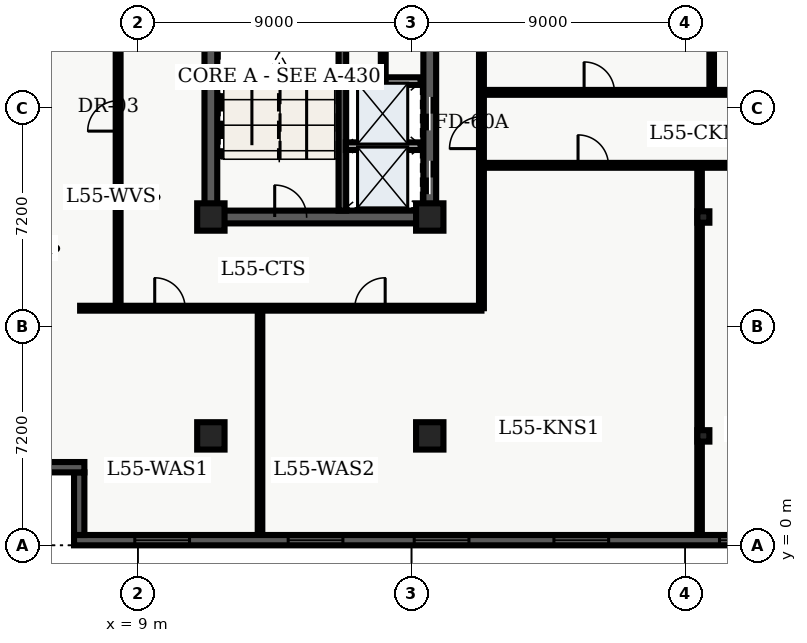
"""IFC4 building model, lengths in metres.
Left out: names, types, materials, properties, quantities, classifications, styles, units other than length and angle.
Written with IfcOpenShell. Run it as: python <this file> out.ifc"""

import sys

from ifc_helpers import new_model, entity, si_unit, converted_unit, direction, frame, origin_with_axes, origin_2d_with_axis, place, context, subcontext, project, spatial, polyline, rectangle, i_section, outline, extrude, element, fill, save


model = new_model("IFC4")
c1 = context("Model", 3, precision=1e-05, world=origin_with_axes(), true_north=direction((0.0, 1.0)))
c2 = subcontext(c1, "Body", "Model", "MODEL_VIEW")
j1 = project(units=[si_unit("LENGTHUNIT", "METRE"), converted_unit("PLANEANGLEUNIT", "DEGREE", entity("IfcPlaneAngleMeasure", 0.017), si_unit("PLANEANGLEUNIT", "RADIAN"), dimensions=[0, 0, 0, 0, 0, 0, 0])], contexts=[c1])
p1 = place(None, origin_with_axes())
s1 = spatial("IfcSite", under=j1, at=p1, CompositionType="ELEMENT")
p2 = place(p1, origin_with_axes())
s2 = spatial("IfcBuilding", under=s1, at=p2, CompositionType="ELEMENT")
p3 = place(p2, frame((0.0, 0.0, 224.7), z_axis=(0.0, 0.0, 1.0), x_axis=(1.0, 0.0, 0.0)))
s3 = spatial("IfcBuildingStorey", under=s2, at=p3, CompositionType="ELEMENT", Elevation=224.7)
p4 = place(p3, frame((11.4, 10.8, 0.0), z_axis=(0.0, 0.0, 1.0), x_axis=(0.0, 1.0, 0.0)))
e1 = element("IfcWall", 1, at=p4, inside=s3, PredefinedType="SHEAR", context=c2, shape_type="SweptSolid", body=[
    extrude(outline(polyline([(0.0, -0.21), (27.0, -0.21), (27.0, 0.21), (0.0, 0.21), (0.0, -0.21)])), origin_with_axes(), (0.0, 0.0, 1.0), 3.66),
])
p5 = place(p3, frame((11.4, 10.8, 0.0), z_axis=(0.0, 0.0, 1.0), x_axis=(1.0, 0.0, 0.0)))
e2 = element("IfcWall", 2, at=p5, inside=s3, PredefinedType="SHEAR", context=c2, shape_type="SweptSolid", body=[
    extrude(outline(polyline([(0.0, -0.21), (7.2, -0.21), (7.2, 0.21), (0.0, 0.21), (0.0, -0.21)])), origin_with_axes(), (0.0, 0.0, 1.0), 3.66),
])
p6 = place(p5, frame((2.625, 0.0, 0.0), z_axis=(0.0, 0.0, 1.0), x_axis=(1.0, 0.0, 0.0)))
e3 = element("IfcOpeningElement", 3, at=p6, cuts=e2, PredefinedType="OPENING", context=c2, shape_type="SweptSolid", body=[
    extrude(rectangle(XDim=1.05, YDim=0.44, at=origin_2d_with_axis()), origin_with_axes(), (0.0, 0.0, 1.0), 2.15),
])
p7 = place(p3, frame((18.6, 10.8, 0.0), z_axis=(0.0, 0.0, 1.0), x_axis=(0.0, 1.0, 0.0)))
e4 = element("IfcWall", 4, at=p7, inside=s3, PredefinedType="SHEAR", context=c2, shape_type="SweptSolid", body=[
    extrude(outline(polyline([(0.0, -0.21), (13.5, -0.21), (13.5, 0.21), (0.0, 0.21), (0.0, -0.21)])), origin_with_axes(), (0.0, 0.0, 1.0), 3.66),
])
p8 = place(p7, frame((1.3, 0.0, 0.0), z_axis=(0.0, 0.0, 1.0), x_axis=(1.0, 0.0, 0.0)))
e5 = element("IfcOpeningElement", 5, at=p8, cuts=e4, PredefinedType="OPENING", context=c2, shape_type="SweptSolid", body=[
    extrude(rectangle(XDim=1.1, YDim=0.44, at=origin_2d_with_axis()), origin_with_axes(), (0.0, 0.0, 1.0), 2.15),
])
p9 = place(p7, frame((3.4, 0.0, 0.0), z_axis=(0.0, 0.0, 1.0), x_axis=(1.0, 0.0, 0.0)))
e6 = element("IfcOpeningElement", 6, at=p9, cuts=e4, PredefinedType="OPENING", context=c2, shape_type="SweptSolid", body=[
    extrude(rectangle(XDim=1.1, YDim=0.44, at=origin_2d_with_axis()), origin_with_axes(), (0.0, 0.0, 1.0), 2.15),
])
p10 = place(p7, frame((11.125, 0.0, 0.0), z_axis=(0.0, 0.0, 1.0), x_axis=(1.0, 0.0, 0.0)))
e7 = element("IfcOpeningElement", 7, at=p10, cuts=e4, PredefinedType="OPENING", context=c2, shape_type="SweptSolid", body=[
    extrude(rectangle(XDim=1.05, YDim=0.44, at=origin_2d_with_axis()), origin_with_axes(), (0.0, 0.0, 1.0), 2.15),
])
p11 = place(p7, frame((6.675, 0.0, 0.0), z_axis=(0.0, 0.0, 1.0), x_axis=(1.0, 0.0, 0.0)))
e8 = element("IfcOpeningElement", 8, at=p11, cuts=e4, PredefinedType="OPENING", context=c2, shape_type="SweptSolid", body=[
    extrude(rectangle(XDim=0.95, YDim=0.44, at=origin_2d_with_axis()), origin_with_axes(), (0.0, 0.0, 1.0), 2.15),
])
p12 = place(p3, frame((15.725, 11.01, 0.0), z_axis=(0.0, 0.0, 1.0), x_axis=(0.0, 1.0, 0.0)))
e9 = element("IfcWall", 9, at=p12, inside=s3, PredefinedType="SHEAR", context=c2, shape_type="SweptSolid", body=[
    extrude(outline(polyline([(0.0, -0.125), (8.69, -0.125), (8.69, 0.125), (0.0, 0.125), (0.0, -0.125)])), origin_with_axes(), (0.0, 0.0, 1.0), 3.66),
])
for number, where, z_axis, x_axis in (
    (10, (11.4, 3.6, 0.0), (0.0, 0.0, 1.0), (1.0, 0.0, 0.0)),
    (11, (11.4, 10.8, 0.0), (0.0, 0.0, 1.0), (1.0, 0.0, 0.0)),
    (12, (18.6, 3.6, 0.0), (0.0, 0.0, 1.0), (1.0, 0.0, 0.0)),
    (13, (18.6, 10.8, 0.0), (0.0, 0.0, 1.0), (1.0, 0.0, 0.0)),
):
    element("IfcColumn", number, at=place(p3, frame(where, z_axis=z_axis, x_axis=x_axis)), inside=s3, PredefinedType="COLUMN", context=c2, shape_type="SweptSolid", body=[
        extrude(rectangle(XDim=0.9, YDim=0.9, at=origin_2d_with_axis()), origin_with_axes(), (0.0, 0.0, 1.0), 3.9),
    ])
for number, where, z_axis, x_axis in (
    (14, (27.6, 3.6, 0.0), (0.0, 0.0, 1.0), (1.0, 0.0, 0.0)),
    (15, (27.6, 10.8, 0.0), (0.0, 0.0, 1.0), (1.0, 0.0, 0.0)),
):
    element("IfcColumn", number, at=place(p3, frame(where, z_axis=z_axis, x_axis=x_axis)), inside=s3, PredefinedType="COLUMN", context=c2, shape_type="SweptSolid", body=[
        extrude(i_section(OverallWidth=0.394, OverallDepth=0.375, WebThickness=0.017, FlangeThickness=0.028, FilletRadius=0.02, at=origin_2d_with_axis()), origin_with_axes(), (0.0, 0.0, 1.0), 3.9),
    ])
for number, where, z_axis, x_axis in (
    (16, (15.84, 13.13, 0.0), (0.0, 0.0, 1.0), (1.0, 0.0, 0.0)),
    (17, (15.84, 15.27, 0.0), (0.0, 0.0, 1.0), (1.0, 0.0, 0.0)),
):
    element("IfcWall", number, at=place(p3, frame(where, z_axis=z_axis, x_axis=x_axis)), inside=s3, PredefinedType="SOLIDWALL", context=c2, shape_type="SweptSolid", body=[
        extrude(outline(polyline([(0.0, -0.125), (2.46, -0.125), (2.46, 0.125), (0.0, 0.125), (0.0, -0.125)])), origin_with_axes(), (0.0, 0.0, 1.0), 2.7),
    ])
p13 = place(p3, frame((17.07, 15.34, 0.0), z_axis=(0.0, 0.0, 1.0), x_axis=(0.0, 1.0, 0.0)))
e18 = element("IfcWall", 18, at=p13, inside=s3, PredefinedType="PARTITIONING", context=c2, shape_type="SweptSolid", body=[
    extrude(outline(polyline([(0.0, -0.08), (4.36, -0.08), (4.36, 0.08), (0.0, 0.08), (0.0, -0.08)])), origin_with_axes(), (0.0, 0.0, 1.0), 2.7),
])
p14 = place(p13, frame((2.05, 0.0, 0.0), z_axis=(0.0, 0.0, 1.0), x_axis=(1.0, 0.0, 0.0)))
e19 = element("IfcOpeningElement", 19, at=p14, cuts=e18, PredefinedType="OPENING", context=c2, shape_type="SweptSolid", body=[
    extrude(rectangle(XDim=0.9, YDim=0.18, at=origin_2d_with_axis()), origin_with_axes(), (0.0, 0.0, 1.0), 2.15),
])
p15 = place(p3, frame((7.1, 7.8, 0.0), z_axis=(0.0, 0.0, 1.0), x_axis=(1.0, 0.0, 0.0)))
e20 = element("IfcWall", 20, at=p15, inside=s3, PredefinedType="PARTITIONING", context=c2, shape_type="SweptSolid", body=[
    extrude(outline(polyline([(0.0, -0.08), (13.2, -0.08), (13.2, 0.08), (0.0, 0.08), (0.0, -0.08)])), origin_with_axes(), (0.0, 0.0, 1.0), 2.7),
])
p16 = place(p15, frame((2.954, 0.0, 0.0), z_axis=(0.0, 0.0, 1.0), x_axis=(1.0, 0.0, 0.0)))
e21 = element("IfcOpeningElement", 21, at=p16, cuts=e20, PredefinedType="OPENING", context=c2, shape_type="SweptSolid", body=[
    extrude(rectangle(XDim=1.0, YDim=0.18, at=origin_2d_with_axis()), origin_with_axes(), (0.0, 0.0, 1.0), 2.15),
])
p17 = place(p15, frame((9.534, 0.0, 0.0), z_axis=(0.0, 0.0, 1.0), x_axis=(1.0, 0.0, 0.0)))
e22 = element("IfcOpeningElement", 22, at=p17, cuts=e20, PredefinedType="OPENING", context=c2, shape_type="SweptSolid", body=[
    extrude(rectangle(XDim=1.0, YDim=0.18, at=origin_2d_with_axis()), origin_with_axes(), (0.0, 0.0, 1.0), 2.15),
])
p18 = place(p3, frame((20.3, 7.8, 0.0), z_axis=(0.0, 0.0, 1.0), x_axis=(0.0, 1.0, 0.0)))
e23 = element("IfcWall", 23, at=p18, inside=s3, PredefinedType="PARTITIONING", context=c2, shape_type="SweptSolid", body=[
    extrude(outline(polyline([(0.0, -0.08), (32.7, -0.08), (32.7, 0.08), (0.0, 0.08), (0.0, -0.08)])), origin_with_axes(), (0.0, 0.0, 1.0), 2.7),
])
p19 = place(p18, frame((22.042, 0.0, 0.0), z_axis=(0.0, 0.0, 1.0), x_axis=(1.0, 0.0, 0.0)))
e24 = element("IfcOpeningElement", 24, at=p19, cuts=e23, PredefinedType="OPENING", context=c2, shape_type="SweptSolid", body=[
    extrude(rectangle(XDim=1.0, YDim=0.18, at=origin_2d_with_axis()), origin_with_axes(), (0.0, 0.0, 1.0), 2.15),
])
p20 = place(p18, frame((27.562, 0.0, 0.0), z_axis=(0.0, 0.0, 1.0), x_axis=(1.0, 0.0, 0.0)))
e25 = element("IfcOpeningElement", 25, at=p20, cuts=e23, PredefinedType="OPENING", context=c2, shape_type="SweptSolid", body=[
    extrude(rectangle(XDim=1.0, YDim=0.18, at=origin_2d_with_axis()), origin_with_axes(), (0.0, 0.0, 1.0), 2.15),
])
p21 = place(p18, frame((5.775, 0.0, 0.0), z_axis=(0.0, 0.0, 1.0), x_axis=(1.0, 0.0, 0.0)))
e26 = element("IfcOpeningElement", 26, at=p21, cuts=e23, PredefinedType="OPENING", context=c2, shape_type="SweptSolid", body=[
    extrude(rectangle(XDim=1.05, YDim=0.18, at=origin_2d_with_axis()), origin_with_axes(), (0.0, 0.0, 1.0), 2.15),
])
p22 = place(p3, frame((8.35, 7.8, 0.0), z_axis=(0.0, 0.0, 1.0), x_axis=(0.0, 1.0, 0.0)))
e27 = element("IfcWall", 27, at=p22, inside=s3, PredefinedType="PARTITIONING", context=c2, shape_type="SweptSolid", body=[
    extrude(outline(polyline([(0.0, -0.08), (12.6, -0.08), (12.6, 0.08), (0.0, 0.08), (0.0, -0.08)])), origin_with_axes(), (0.0, 0.0, 1.0), 2.7),
])
p23 = place(p22, frame((6.325, 0.0, 0.0), z_axis=(0.0, 0.0, 1.0), x_axis=(1.0, 0.0, 0.0)))
e28 = element("IfcOpeningElement", 28, at=p23, cuts=e27, PredefinedType="OPENING", context=c2, shape_type="SweptSolid", body=[
    extrude(rectangle(XDim=1.0, YDim=0.18, at=origin_2d_with_axis()), origin_with_axes(), (0.0, 0.0, 1.0), 2.15),
])
p24 = place(p3, frame((13.017, 0.335, 0.0), z_axis=(0.0, 0.0, 1.0), x_axis=(0.0, 1.0, 0.0)))
e29 = element("IfcWall", 29, at=p24, inside=s3, PredefinedType="PARTITIONING", context=c2, shape_type="SweptSolid", body=[
    extrude(outline(polyline([(0.0, -0.075), (7.365, -0.075), (7.365, 0.075), (0.0, 0.075), (0.0, -0.075)])), origin_with_axes(), (0.0, 0.0, 1.0), 2.7),
])
p25 = place(p3, frame((20.3, 12.5, 0.0), z_axis=(0.0, 0.0, 1.0), x_axis=(1.0, 0.0, 0.0)))
e30 = element("IfcWall", 30, at=p25, inside=s3, PredefinedType="PARTITIONING", context=c2, shape_type="SweptSolid", body=[
    extrude(outline(polyline([(0.0, -0.08), (16.05, -0.08), (16.05, 0.08), (0.0, 0.08), (0.0, -0.08)])), origin_with_axes(), (0.0, 0.0, 1.0), 2.7),
])
p26 = place(p25, frame((3.677, 0.0, 0.0), z_axis=(0.0, 0.0, 1.0), x_axis=(1.0, 0.0, 0.0)))
e31 = element("IfcOpeningElement", 31, at=p26, cuts=e30, PredefinedType="OPENING", context=c2, shape_type="SweptSolid", body=[
    extrude(rectangle(XDim=1.0, YDim=0.18, at=origin_2d_with_axis()), origin_with_axes(), (0.0, 0.0, 1.0), 2.15),
])
p27 = place(p25, frame((11.572, 0.0, 0.0), z_axis=(0.0, 0.0, 1.0), x_axis=(1.0, 0.0, 0.0)))
e32 = element("IfcOpeningElement", 32, at=p27, cuts=e30, PredefinedType="OPENING", context=c2, shape_type="SweptSolid", body=[
    extrude(rectangle(XDim=1.0, YDim=0.18, at=origin_2d_with_axis()), origin_with_axes(), (0.0, 0.0, 1.0), 2.15),
])
p28 = place(p3, frame((20.3, 14.9, 0.0), z_axis=(0.0, 0.0, 1.0), x_axis=(1.0, 0.0, 0.0)))
e33 = element("IfcWall", 33, at=p28, inside=s3, PredefinedType="PARTITIONING", context=c2, shape_type="SweptSolid", body=[
    extrude(outline(polyline([(0.0, -0.08), (16.05, -0.08), (16.05, 0.08), (0.0, 0.08), (0.0, -0.08)])), origin_with_axes(), (0.0, 0.0, 1.0), 2.7),
])
p29 = place(p28, frame((3.877, 0.0, 0.0), z_axis=(0.0, 0.0, 1.0), x_axis=(1.0, 0.0, 0.0)))
e34 = element("IfcOpeningElement", 34, at=p29, cuts=e33, PredefinedType="OPENING", context=c2, shape_type="SweptSolid", body=[
    extrude(rectangle(XDim=1.0, YDim=0.18, at=origin_2d_with_axis()), origin_with_axes(), (0.0, 0.0, 1.0), 2.15),
])
p30 = place(p28, frame((9.511, 0.0, 0.0), z_axis=(0.0, 0.0, 1.0), x_axis=(1.0, 0.0, 0.0)))
e35 = element("IfcOpeningElement", 35, at=p30, cuts=e33, PredefinedType="OPENING", context=c2, shape_type="SweptSolid", body=[
    extrude(rectangle(XDim=1.0, YDim=0.18, at=origin_2d_with_axis()), origin_with_axes(), (0.0, 0.0, 1.0), 2.15),
])
p31 = place(p28, frame((13.709, 0.0, 0.0), z_axis=(0.0, 0.0, 1.0), x_axis=(1.0, 0.0, 0.0)))
e36 = element("IfcOpeningElement", 36, at=p31, cuts=e33, PredefinedType="OPENING", context=c2, shape_type="SweptSolid", body=[
    extrude(rectangle(XDim=1.0, YDim=0.18, at=origin_2d_with_axis()), origin_with_axes(), (0.0, 0.0, 1.0), 2.15),
])
p32 = place(p3, frame((27.474, 0.335, 0.0), z_axis=(0.0, 0.0, 1.0), x_axis=(0.0, 1.0, 0.0)))
e37 = element("IfcWall", 37, at=p32, inside=s3, PredefinedType="PARTITIONING", context=c2, shape_type="SweptSolid", body=[
    extrude(outline(polyline([(0.0, -0.075), (12.045, -0.075), (12.045, 0.075), (0.0, 0.075), (0.0, -0.075)])), origin_with_axes(), (0.0, 0.0, 1.0), 2.7),
])
p33 = place(p3, frame((27.873, 15.02, 0.0), z_axis=(0.0, 0.0, 1.0), x_axis=(0.0, 1.0, 0.0)))
e38 = element("IfcWall", 38, at=p33, inside=s3, PredefinedType="PARTITIONING", context=c2, shape_type="SweptSolid", body=[
    extrude(outline(polyline([(0.0, -0.075), (6.2, -0.075), (6.2, 0.075), (0.0, 0.075), (0.0, -0.075)])), origin_with_axes(), (0.0, 0.0, 1.0), 2.7),
])
p34 = place(p3, frame((49.46, 0.17, 0.0), z_axis=(0.0, 0.0, 1.0), x_axis=(-1.0, 0.0, 0.0)))
e39 = element("IfcWall", 39, at=p34, inside=s3, PredefinedType="SOLIDWALL", context=c2, shape_type="SweptSolid", body=[
    extrude(outline(polyline([(0.0, -0.17), (42.56, -0.17), (42.56, 0.17), (0.0, 0.17), (0.0, -0.17)])), origin_with_axes(), (0.0, 0.0, 1.0), 3.66),
])
p35 = place(p34, frame((2.898, 0.0, 0.45), z_axis=(0.0, 0.0, 1.0), x_axis=(1.0, 0.0, 0.0)))
e40 = element("IfcOpeningElement", 40, at=p35, cuts=e39, PredefinedType="OPENING", context=c2, shape_type="SweptSolid", body=[
    extrude(rectangle(XDim=1.8, YDim=0.36, at=origin_2d_with_axis()), origin_with_axes(), (0.0, 0.0, 1.0), 2.1),
])
p36 = place(p34, frame((7.493, 0.0, 0.45), z_axis=(0.0, 0.0, 1.0), x_axis=(1.0, 0.0, 0.0)))
e41 = element("IfcOpeningElement", 41, at=p36, cuts=e39, PredefinedType="OPENING", context=c2, shape_type="SweptSolid", body=[
    extrude(rectangle(XDim=1.8, YDim=0.36, at=origin_2d_with_axis()), origin_with_axes(), (0.0, 0.0, 1.0), 2.1),
])
p37 = place(p34, frame((12.089, 0.0, 0.45), z_axis=(0.0, 0.0, 1.0), x_axis=(1.0, 0.0, 0.0)))
e42 = element("IfcOpeningElement", 42, at=p37, cuts=e39, PredefinedType="OPENING", context=c2, shape_type="SweptSolid", body=[
    extrude(rectangle(XDim=1.8, YDim=0.36, at=origin_2d_with_axis()), origin_with_axes(), (0.0, 0.0, 1.0), 2.1),
])
p38 = place(p34, frame((16.684, 0.0, 0.45), z_axis=(0.0, 0.0, 1.0), x_axis=(1.0, 0.0, 0.0)))
e43 = element("IfcOpeningElement", 43, at=p38, cuts=e39, PredefinedType="OPENING", context=c2, shape_type="SweptSolid", body=[
    extrude(rectangle(XDim=1.8, YDim=0.36, at=origin_2d_with_axis()), origin_with_axes(), (0.0, 0.0, 1.0), 2.1),
])
p39 = place(p34, frame((20.43, 0.0, 0.45), z_axis=(0.0, 0.0, 1.0), x_axis=(1.0, 0.0, 0.0)))
e44 = element("IfcOpeningElement", 44, at=p39, cuts=e39, PredefinedType="OPENING", context=c2, shape_type="SweptSolid", body=[
    extrude(rectangle(XDim=1.8, YDim=0.36, at=origin_2d_with_axis()), origin_with_axes(), (0.0, 0.0, 1.0), 2.1),
])
p40 = place(p34, frame((25.876, 0.0, 0.45), z_axis=(0.0, 0.0, 1.0), x_axis=(1.0, 0.0, 0.0)))
e45 = element("IfcOpeningElement", 45, at=p40, cuts=e39, PredefinedType="OPENING", context=c2, shape_type="SweptSolid", body=[
    extrude(rectangle(XDim=1.8, YDim=0.36, at=origin_2d_with_axis()), origin_with_axes(), (0.0, 0.0, 1.0), 2.1),
])
p41 = place(p34, frame((30.471, 0.0, 0.45), z_axis=(0.0, 0.0, 1.0), x_axis=(1.0, 0.0, 0.0)))
e46 = element("IfcOpeningElement", 46, at=p41, cuts=e39, PredefinedType="OPENING", context=c2, shape_type="SweptSolid", body=[
    extrude(rectangle(XDim=1.8, YDim=0.36, at=origin_2d_with_axis()), origin_with_axes(), (0.0, 0.0, 1.0), 2.1),
])
p42 = place(p34, frame((34.617, 0.0, 0.45), z_axis=(0.0, 0.0, 1.0), x_axis=(1.0, 0.0, 0.0)))
e47 = element("IfcOpeningElement", 47, at=p42, cuts=e39, PredefinedType="OPENING", context=c2, shape_type="SweptSolid", body=[
    extrude(rectangle(XDim=1.8, YDim=0.36, at=origin_2d_with_axis()), origin_with_axes(), (0.0, 0.0, 1.0), 2.1),
])
p43 = place(p34, frame((39.662, 0.0, 0.45), z_axis=(0.0, 0.0, 1.0), x_axis=(1.0, 0.0, 0.0)))
e48 = element("IfcOpeningElement", 48, at=p43, cuts=e39, PredefinedType="OPENING", context=c2, shape_type="SweptSolid", body=[
    extrude(rectangle(XDim=1.8, YDim=0.36, at=origin_2d_with_axis()), origin_with_axes(), (0.0, 0.0, 1.0), 2.1),
])
p44 = place(p3, frame((7.07, 0.34, 0.0), z_axis=(0.0, 0.0, 1.0), x_axis=(0.0, 1.0, 0.0)))
e49 = element("IfcWall", 49, at=p44, inside=s3, PredefinedType="SOLIDWALL", context=c2, shape_type="SweptSolid", body=[
    extrude(outline(polyline([(0.0, -0.17), (2.06, -0.17), (2.06, 0.17), (0.0, 0.17), (0.0, -0.17)])), origin_with_axes(), (0.0, 0.0, 1.0), 3.66),
])
p45 = place(p3, frame((7.24, 2.57, 0.0), z_axis=(0.0, 0.0, 1.0), x_axis=(-1.0, 0.0, 0.0)))
e50 = element("IfcWall", 50, at=p45, inside=s3, PredefinedType="SOLIDWALL", context=c2, shape_type="SweptSolid", body=[
    extrude(outline(polyline([(0.0, -0.17), (2.74, -0.17), (2.74, 0.17), (0.0, 0.17), (0.0, -0.17)])), origin_with_axes(), (0.0, 0.0, 1.0), 3.66),
])
p46 = place(p7, frame((1.3, 0.0, 0.0), z_axis=(0.0, 0.0, 1.0), x_axis=(1.0, 0.0, 0.0)))
e51 = element("IfcDoor", 51, at=p46, inside=s3, OperationType="SLIDING_TO_LEFT", PredefinedType="DOOR", context=c2, shape_type="SweptSolid", body=[
    extrude(rectangle(XDim=1.1, YDim=0.09, at=origin_2d_with_axis()), origin_with_axes(), (0.0, 0.0, 1.0), 2.15),
])
fill(e5, e51)
p47 = place(p7, frame((3.4, 0.0, 0.0), z_axis=(0.0, 0.0, 1.0), x_axis=(1.0, 0.0, 0.0)))
e52 = element("IfcDoor", 52, at=p47, inside=s3, OperationType="SLIDING_TO_RIGHT", PredefinedType="DOOR", context=c2, shape_type="SweptSolid", body=[
    extrude(rectangle(XDim=1.1, YDim=0.09, at=origin_2d_with_axis()), origin_with_axes(), (0.0, 0.0, 1.0), 2.15),
])
fill(e6, e52)
p48 = place(p5, frame((2.625, 0.0, 0.0), z_axis=(0.0, 0.0, 1.0), x_axis=(1.0, 0.0, 0.0)))
e53 = element("IfcDoor", 53, at=p48, inside=s3, OperationType="SINGLE_SWING_LEFT", PredefinedType="DOOR", context=c2, shape_type="SweptSolid", body=[
    extrude(rectangle(XDim=1.05, YDim=0.09, at=origin_2d_with_axis()), origin_with_axes(), (0.0, 0.0, 1.0), 2.15),
])
fill(e3, e53)
p49 = place(p22, frame((6.325, 0.0, 0.0), z_axis=(0.0, 0.0, 1.0), x_axis=(1.0, 0.0, 0.0)))
e54 = element("IfcDoor", 54, at=p49, inside=s3, OperationType="SINGLE_SWING_LEFT", PredefinedType="DOOR", context=c2, shape_type="SweptSolid", body=[
    extrude(rectangle(XDim=1.0, YDim=0.09, at=origin_2d_with_axis()), origin_with_axes(), (0.0, 0.0, 1.0), 2.15),
])
fill(e28, e54)
p50 = place(p15, frame((2.954, 0.0, 0.0), z_axis=(0.0, 0.0, 1.0), x_axis=(1.0, 0.0, 0.0)))
e55 = element("IfcDoor", 55, at=p50, inside=s3, OperationType="SINGLE_SWING_LEFT", PredefinedType="DOOR", context=c2, shape_type="SweptSolid", body=[
    extrude(rectangle(XDim=1.0, YDim=0.09, at=origin_2d_with_axis()), origin_with_axes(), (0.0, 0.0, 1.0), 2.15),
])
fill(e21, e55)
p51 = place(p15, frame((9.534, 0.0, 0.0), z_axis=(0.0, 0.0, 1.0), x_axis=(1.0, 0.0, 0.0)))
e56 = element("IfcDoor", 56, at=p51, inside=s3, OperationType="SINGLE_SWING_RIGHT", PredefinedType="DOOR", context=c2, shape_type="SweptSolid", body=[
    extrude(rectangle(XDim=1.0, YDim=0.09, at=origin_2d_with_axis()), origin_with_axes(), (0.0, 0.0, 1.0), 2.15),
])
fill(e22, e56)
p52 = place(p18, frame((5.775, 0.0, 0.0), z_axis=(0.0, 0.0, 1.0), x_axis=(1.0, 0.0, 0.0)))
e57 = element("IfcDoor", 57, at=p52, inside=s3, OperationType="SINGLE_SWING_LEFT", PredefinedType="DOOR", context=c2, shape_type="SweptSolid", body=[
    extrude(rectangle(XDim=1.05, YDim=0.09, at=origin_2d_with_axis()), origin_with_axes(), (0.0, 0.0, 1.0), 2.15),
])
fill(e26, e57)
p53 = place(p25, frame((3.677, 0.0, 0.0), z_axis=(0.0, 0.0, 1.0), x_axis=(1.0, 0.0, 0.0)))
e58 = element("IfcDoor", 58, at=p53, inside=s3, OperationType="SINGLE_SWING_LEFT", PredefinedType="DOOR", context=c2, shape_type="SweptSolid", body=[
    extrude(rectangle(XDim=1.0, YDim=0.09, at=origin_2d_with_axis()), origin_with_axes(), (0.0, 0.0, 1.0), 2.15),
])
fill(e31, e58)
p54 = place(p28, frame((3.877, 0.0, 0.0), z_axis=(0.0, 0.0, 1.0), x_axis=(1.0, 0.0, 0.0)))
e59 = element("IfcDoor", 59, at=p54, inside=s3, OperationType="SINGLE_SWING_LEFT", PredefinedType="DOOR", context=c2, shape_type="SweptSolid", body=[
    extrude(rectangle(XDim=1.0, YDim=0.09, at=origin_2d_with_axis()), origin_with_axes(), (0.0, 0.0, 1.0), 2.15),
])
fill(e34, e59)
p55 = place(p34, frame((20.43, 0.0, 0.45), z_axis=(0.0, 0.0, 1.0), x_axis=(1.0, 0.0, 0.0)))
e60 = element("IfcWindow", 60, at=p55, inside=s3, PredefinedType="WINDOW", context=c2, shape_type="SweptSolid", body=[
    extrude(rectangle(XDim=1.8, YDim=0.09, at=origin_2d_with_axis()), origin_with_axes(), (0.0, 0.0, 1.0), 2.1),
])
fill(e44, e60)
p56 = place(p34, frame((25.876, 0.0, 0.45), z_axis=(0.0, 0.0, 1.0), x_axis=(1.0, 0.0, 0.0)))
e61 = element("IfcWindow", 61, at=p56, inside=s3, PredefinedType="WINDOW", context=c2, shape_type="SweptSolid", body=[
    extrude(rectangle(XDim=1.8, YDim=0.09, at=origin_2d_with_axis()), origin_with_axes(), (0.0, 0.0, 1.0), 2.1),
])
fill(e45, e61)
p57 = place(p34, frame((30.471, 0.0, 0.45), z_axis=(0.0, 0.0, 1.0), x_axis=(1.0, 0.0, 0.0)))
e62 = element("IfcWindow", 62, at=p57, inside=s3, PredefinedType="WINDOW", context=c2, shape_type="SweptSolid", body=[
    extrude(rectangle(XDim=1.8, YDim=0.09, at=origin_2d_with_axis()), origin_with_axes(), (0.0, 0.0, 1.0), 2.1),
])
fill(e46, e62)
p58 = place(p34, frame((34.617, 0.0, 0.45), z_axis=(0.0, 0.0, 1.0), x_axis=(1.0, 0.0, 0.0)))
e63 = element("IfcWindow", 63, at=p58, inside=s3, PredefinedType="WINDOW", context=c2, shape_type="SweptSolid", body=[
    extrude(rectangle(XDim=1.8, YDim=0.09, at=origin_2d_with_axis()), origin_with_axes(), (0.0, 0.0, 1.0), 2.1),
])
fill(e47, e63)
p59 = place(p34, frame((39.662, 0.0, 0.45), z_axis=(0.0, 0.0, 1.0), x_axis=(1.0, 0.0, 0.0)))
e64 = element("IfcWindow", 64, at=p59, inside=s3, PredefinedType="WINDOW", context=c2, shape_type="SweptSolid", body=[
    extrude(rectangle(XDim=1.8, YDim=0.09, at=origin_2d_with_axis()), origin_with_axes(), (0.0, 0.0, 1.0), 2.1),
])
fill(e48, e64)
save(model, sys.argv[1])
